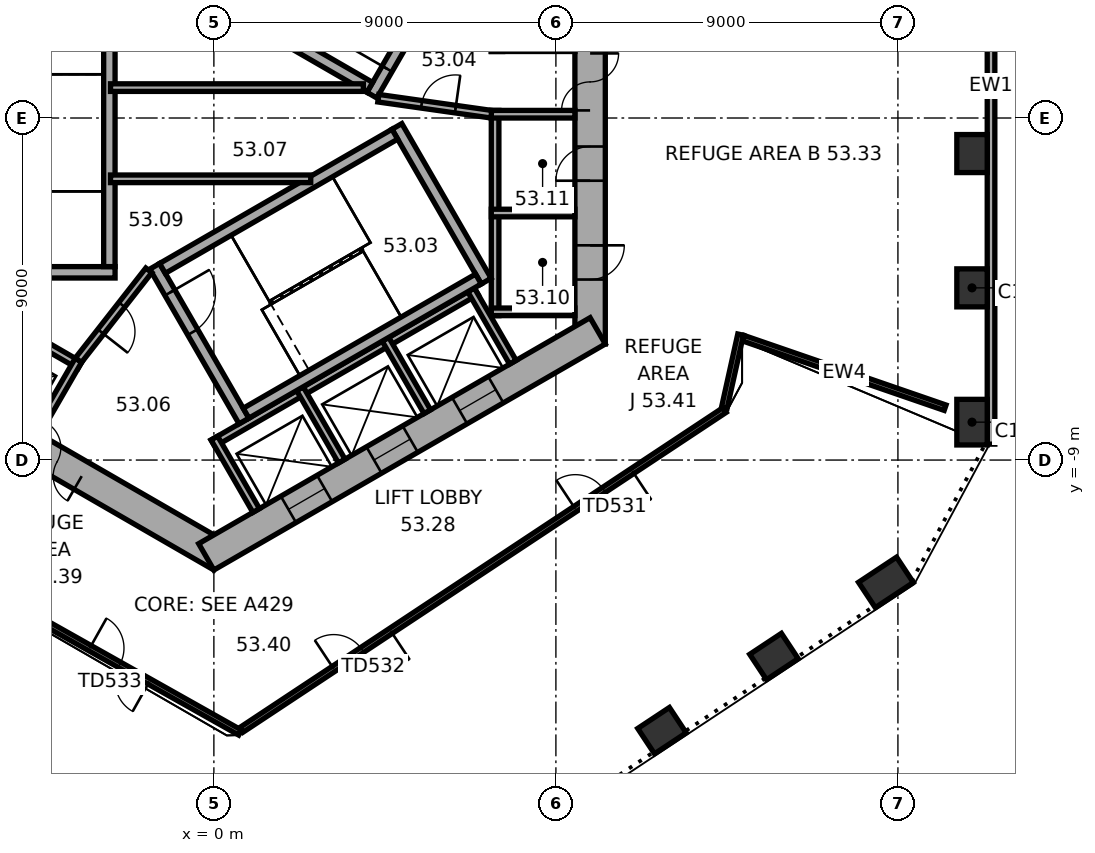
"""IFC4 building model, lengths in metres.
Left out: names, types, materials, properties, quantities, classifications, styles, units other than length and angle.
Written with IfcOpenShell. Run it as: python <this file> out.ifc"""

import sys

from ifc_helpers import new_model, si_unit, direction, frame, frame_2d, origin, origin_2d, place, context, subcontext, project, spatial, rectangle, extrude, element, fill, save


model = new_model("IFC4")
c1 = context("Model", 3, precision=1e-05, world=origin(), true_north=direction((0.0, 1.0)))
c2 = subcontext(c1, "Body", "Model", "MODEL_VIEW")
j1 = project(units=[si_unit("LENGTHUNIT", "METRE"), si_unit("PLANEANGLEUNIT", "RADIAN")], contexts=[c1])
p1 = place(None, origin())
s1 = spatial("IfcSite", under=j1, at=p1, CompositionType="ELEMENT")
p2 = place(p1, origin())
s2 = spatial("IfcBuilding", under=s1, at=p2, CompositionType="ELEMENT")
p3 = place(p2, frame((0.0, 0.0, 214.3)))
s3 = spatial("IfcBuildingStorey", under=s2, at=p3, CompositionType="ELEMENT", Elevation=214.3)
p4 = place(p3, frame((19.95, -8.003, 0.0), z_axis=(0.0, 0.0, 1.0), x_axis=(0.0, 1.0, 0.0)))
e1 = element("IfcColumn", 1, at=p4, inside=s3, PredefinedType="COLUMN", context=c2, shape_type="SweptSolid", body=[
    extrude(rectangle(XDim=1.2, YDim=0.8, at=origin_2d()), origin(), (0.0, 0.0, 1.0), 7.4),
])
for number, where, z_axis, x_axis in (
    (2, (19.95, -4.469, 0.0), (0.0, 0.0, 1.0), (0.0, 1.0, 0.0)),
    (3, (19.95, -0.936, 0.0), (0.0, 0.0, 1.0), (0.0, 1.0, 0.0)),
    (4, (11.791, -16.12, 0.0), (0.0, 0.0, 1.0), (0.834, 0.552, 0.0)),
    (5, (14.738, -14.169, 0.0), (0.0, 0.0, 1.0), (0.834, 0.552, 0.0)),
):
    element("IfcColumn", number, at=place(p3, frame(where, z_axis=z_axis, x_axis=x_axis)), inside=s3, PredefinedType="COLUMN", context=c2, shape_type="SweptSolid", body=[
        extrude(rectangle(XDim=1.0, YDim=0.8, at=origin_2d()), origin(), (0.0, 0.0, 1.0), 7.4),
    ])
p5 = place(p3, frame((17.685, -12.219, 0.0), z_axis=(0.0, 0.0, 1.0), x_axis=(0.833885822067, 0.551936985312, 0.0)))
e6 = element("IfcColumn", 6, at=p5, inside=s3, PredefinedType="COLUMN", context=c2, shape_type="SweptSolid", body=[
    extrude(rectangle(XDim=1.2, YDim=0.8, at=origin_2d()), origin(), (0.0, 0.0, 1.0), 7.4),
])
p6 = place(p3, frame((9.9, -5.947, 0.0), z_axis=(0.0, 0.0, 1.0), x_axis=(0.0, 1.0, 0.0)))
e7 = element("IfcWall", 7, at=p6, inside=s3, PredefinedType="SHEAR", context=c2, shape_type="SweptSolid", body=[
    extrude(rectangle(XDim=11.894, YDim=0.8, at=frame_2d((5.947, 0.0))), origin(), (0.0, 0.0, 1.0), 7.4),
])
p7 = place(p6, frame((6.147, 0.0, 0.0)))
e8 = element("IfcOpeningElement", 8, at=p7, cuts=e7, PredefinedType="OPENING", context=c2, shape_type="SweptSolid", body=[
    extrude(rectangle(XDim=1.5, YDim=2.1, at=frame_2d((0.75, 1.05))), frame((0.0, 0.41, 0.0), z_axis=(0.0, -1.0, 0.0), x_axis=(1.0, 0.0, 0.0)), (0.0, 0.0, 1.0), 0.82),
])
p8 = place(p6, frame((1.697, 0.0, 0.0)))
e9 = element("IfcOpeningElement", 9, at=p8, cuts=e7, PredefinedType="OPENING", context=c2, shape_type="SweptSolid", body=[
    extrude(rectangle(XDim=0.9, YDim=2.1, at=frame_2d((0.45, 1.05))), frame((0.0, 0.41, 0.0), z_axis=(0.0, -1.0, 0.0), x_axis=(1.0, 0.0, 0.0)), (0.0, 0.0, 1.0), 0.82),
])
p9 = place(p6, frame((4.297, 0.0, 0.0)))
e10 = element("IfcOpeningElement", 10, at=p9, cuts=e7, PredefinedType="OPENING", context=c2, shape_type="SweptSolid", body=[
    extrude(rectangle(XDim=0.9, YDim=2.1, at=frame_2d((0.45, 1.05))), frame((0.0, 0.41, 0.0), z_axis=(0.0, -1.0, 0.0), x_axis=(1.0, 0.0, 0.0)), (0.0, 0.0, 1.0), 0.82),
])
p10 = place(p3, frame((-10.1, -5.6, 0.0), z_axis=(0.0, 0.0, 1.0), x_axis=(0.866023897231, -0.500002609418, 0.0)))
e11 = element("IfcWall", 11, at=p10, inside=s3, PredefinedType="SHEAR", context=c2, shape_type="SweptSolid", body=[
    extrude(rectangle(XDim=11.894, YDim=0.8, at=frame_2d((5.947, 0.0))), origin(), (0.0, 0.0, 1.0), 7.4),
])
p11 = place(p10, frame((6.147, 0.0, 0.0)))
e12 = element("IfcOpeningElement", 12, at=p11, cuts=e11, PredefinedType="OPENING", context=c2, shape_type="SweptSolid", body=[
    extrude(rectangle(XDim=1.5, YDim=2.1, at=frame_2d((0.75, 1.05))), frame((0.0, 0.41, 0.0), z_axis=(0.0, -1.0, 0.0), x_axis=(1.0, 0.0, 0.0)), (0.0, 0.0, 1.0), 0.82),
])
p12 = place(p10, frame((1.597, 0.0, 0.0)))
e13 = element("IfcOpeningElement", 13, at=p12, cuts=e11, PredefinedType="OPENING", context=c2, shape_type="SweptSolid", body=[
    extrude(rectangle(XDim=1.1, YDim=2.1, at=frame_2d((0.55, 1.05))), frame((0.0, 0.41, 0.0), z_axis=(0.0, -1.0, 0.0), x_axis=(1.0, 0.0, 0.0)), (0.0, 0.0, 1.0), 0.82),
])
p13 = place(p10, frame((4.197, 0.0, 0.0)))
e14 = element("IfcOpeningElement", 14, at=p13, cuts=e11, PredefinedType="OPENING", context=c2, shape_type="SweptSolid", body=[
    extrude(rectangle(XDim=1.1, YDim=2.1, at=frame_2d((0.55, 1.05))), frame((0.0, 0.41, 0.0), z_axis=(0.0, -1.0, 0.0), x_axis=(1.0, 0.0, 0.0)), (0.0, 0.0, 1.0), 0.82),
])
p14 = place(p3, frame((-0.2, -11.547, 0.0), z_axis=(0.0, 0.0, 1.0), x_axis=(0.866023897231, 0.500002609418, 0.0)))
e15 = element("IfcWall", 15, at=p14, inside=s3, PredefinedType="SHEAR", context=c2, shape_type="SweptSolid", body=[
    extrude(rectangle(XDim=11.894, YDim=0.8, at=frame_2d((5.947, 0.0))), origin(), (0.0, 0.0, 1.0), 7.4),
])
p15 = place(p14, frame((2.497, 0.0, 0.0)))
e16 = element("IfcOpeningElement", 16, at=p15, cuts=e15, PredefinedType="OPENING", context=c2, shape_type="SweptSolid", body=[
    extrude(rectangle(XDim=1.1, YDim=2.1, at=frame_2d((0.55, 1.05))), frame((0.0, 0.41, 0.0), z_axis=(0.0, -1.0, 0.0), x_axis=(1.0, 0.0, 0.0)), (0.0, 0.0, 1.0), 0.82),
])
p16 = place(p14, frame((5.097, 0.0, 0.0)))
e17 = element("IfcOpeningElement", 17, at=p16, cuts=e15, PredefinedType="OPENING", context=c2, shape_type="SweptSolid", body=[
    extrude(rectangle(XDim=1.1, YDim=2.1, at=frame_2d((0.55, 1.05))), frame((0.0, 0.41, 0.0), z_axis=(0.0, -1.0, 0.0), x_axis=(1.0, 0.0, 0.0)), (0.0, 0.0, 1.0), 0.82),
])
p17 = place(p14, frame((7.697, 0.0, 0.0)))
e18 = element("IfcOpeningElement", 18, at=p17, cuts=e15, PredefinedType="OPENING", context=c2, shape_type="SweptSolid", body=[
    extrude(rectangle(XDim=1.1, YDim=2.1, at=frame_2d((0.55, 1.05))), frame((0.0, 0.41, 0.0), z_axis=(0.0, -1.0, 0.0), x_axis=(1.0, 0.0, 0.0)), (0.0, 0.0, 1.0), 0.82),
])
p18 = place(p3, frame((20.45, -8.581, 0.0), z_axis=(0.0, 0.0, 1.0), x_axis=(0.0, 1.0, 0.0)))
e19 = element("IfcWall", 19, at=p18, inside=s3, PredefinedType="STANDARD", context=c2, shape_type="SweptSolid", body=[
    extrude(rectangle(XDim=18.832, YDim=0.2, at=frame_2d((9.416, 0.0))), origin(), (0.0, 0.0, 1.0), 7.4),
])
p19 = place(p3, frame((19.242, -7.623, 0.0), z_axis=(0.0, 0.0, 1.0), x_axis=(-0.945463903204, 0.325726891334, 0.0)))
e20 = element("IfcWall", 20, at=p19, inside=s3, PredefinedType="STANDARD", context=c2, shape_type="SweptSolid", body=[
    extrude(rectangle(XDim=5.619, YDim=0.15, at=frame_2d((2.81, 0.0))), origin(), (0.0, 0.0, 1.0), 2.6),
])
p20 = place(p3, frame((13.859, -5.699, 0.0), z_axis=(0.0, 0.0, 1.0), x_axis=(-0.216825744963, -0.976210323814, 0.0)))
e21 = element("IfcWall", 21, at=p20, inside=s3, PredefinedType="STANDARD", context=c2, shape_type="SweptSolid", body=[
    extrude(rectangle(XDim=1.975, YDim=0.15, at=frame_2d((0.987, 0.0))), origin(), (0.0, 0.0, 1.0), 2.6),
])
p21 = place(p3, frame((13.44, -7.683, 0.0), z_axis=(0.0, 0.0, 1.0), x_axis=(-0.833878347594, -0.551948277844, 0.0)))
e22 = element("IfcWall", 22, at=p21, inside=s3, PredefinedType="STANDARD", context=c2, shape_type="SweptSolid", body=[
    extrude(rectangle(XDim=15.249, YDim=0.15, at=frame_2d((7.625, 0.0))), origin(), (0.0, 0.0, 1.0), 2.6),
])
p22 = place(p21, frame((2.912, 0.0, 0.0)))
e23 = element("IfcOpeningElement", 23, at=p22, cuts=e22, PredefinedType="OPENING", context=c2, shape_type="SweptSolid", body=[
    extrude(rectangle(XDim=1.8, YDim=2.4, at=frame_2d((0.9, 1.2))), frame((0.0, 0.085, 0.0), z_axis=(0.0, -1.0, 0.0), x_axis=(1.0, 0.0, 0.0)), (0.0, 0.0, 1.0), 0.17),
])
p23 = place(p21, frame((10.537, 0.0, 0.0)))
e24 = element("IfcOpeningElement", 24, at=p23, cuts=e22, PredefinedType="OPENING", context=c2, shape_type="SweptSolid", body=[
    extrude(rectangle(XDim=1.8, YDim=2.4, at=frame_2d((0.9, 1.2))), frame((0.0, 0.085, 0.0), z_axis=(0.0, -1.0, 0.0), x_axis=(1.0, 0.0, 0.0)), (0.0, 0.0, 1.0), 0.17),
])
p24 = place(p3, frame((0.69, -16.171, 0.0), z_axis=(0.0, 0.0, 1.0), x_axis=(-0.871655280677, 0.490119446326, 0.0)))
e25 = element("IfcWall", 25, at=p24, inside=s3, PredefinedType="STANDARD", context=c2, shape_type="SweptSolid", body=[
    extrude(rectangle(XDim=14.552, YDim=0.15, at=frame_2d((7.276, 0.0))), origin(), (0.0, 0.0, 1.0), 2.6),
])
p25 = place(p24, frame((2.738, 0.0, 0.0)))
e26 = element("IfcOpeningElement", 26, at=p25, cuts=e25, PredefinedType="OPENING", context=c2, shape_type="SweptSolid", body=[
    extrude(rectangle(XDim=1.8, YDim=2.4, at=frame_2d((0.9, 1.2))), frame((0.0, 0.085, 0.0), z_axis=(0.0, -1.0, 0.0), x_axis=(1.0, 0.0, 0.0)), (0.0, 0.0, 1.0), 0.17),
])
p26 = place(p24, frame((10.014, 0.0, 0.0)))
e27 = element("IfcOpeningElement", 27, at=p26, cuts=e25, PredefinedType="OPENING", context=c2, shape_type="SweptSolid", body=[
    extrude(rectangle(XDim=1.8, YDim=2.4, at=frame_2d((0.9, 1.2))), frame((0.0, 0.085, 0.0), z_axis=(0.0, -1.0, 0.0), x_axis=(1.0, 0.0, 0.0)), (0.0, 0.0, 1.0), 0.17),
])
p27 = place(p3, frame((7.4, -5.2, 0.0), z_axis=(0.0, 0.0, 1.0), x_axis=(0.0, 1.0, 0.0)))
e28 = element("IfcWall", 28, at=p27, inside=s3, PredefinedType="PARTITIONING", context=c2, shape_type="SweptSolid", body=[
    extrude(rectangle(XDim=5.4, YDim=0.2, at=frame_2d((2.7, 0.0))), origin(), (0.0, 0.0, 1.0), 7.12),
])
for number, where, z_axis, x_axis in (
    (29, (7.3, -5.1, 0.0), (0.0, 0.0, 1.0), (1.0, 0.0, 0.0)),
    (30, (7.3, -2.5, 0.0), (0.0, 0.0, 1.0), (1.0, 0.0, 0.0)),
    (31, (7.3, 0.1, 0.0), (0.0, 0.0, 1.0), (1.0, 0.0, 0.0)),
):
    element("IfcWall", number, at=place(p3, frame(where, z_axis=z_axis, x_axis=x_axis)), inside=s3, PredefinedType="PARTITIONING", context=c2, shape_type="SweptSolid", body=[
        extrude(rectangle(XDim=2.2, YDim=0.2, at=frame_2d((1.1, 0.0))), origin(), (0.0, 0.0, 1.0), 7.12),
    ])
p28 = place(p3, frame((-8.203, -3.809, 0.0), z_axis=(0.0, 0.0, 1.0), x_axis=(0.866028230842, -0.499995103361, 0.0)))
e32 = element("IfcWall", 32, at=p28, inside=s3, PredefinedType="PARTITIONING", context=c2, shape_type="SweptSolid", body=[
    extrude(rectangle(XDim=5.4, YDim=0.2, at=frame_2d((2.7, 0.0))), origin(), (0.0, 0.0, 1.0), 7.12),
])
p29 = place(p3, frame((-3.563, -6.372, 0.0), z_axis=(0.0, 0.0, 1.0), x_axis=(-0.499994660107, -0.866028486751, 0.0)))
e33 = element("IfcWall", 33, at=p29, inside=s3, PredefinedType="PARTITIONING", context=c2, shape_type="SweptSolid", body=[
    extrude(rectangle(XDim=2.2, YDim=0.2, at=frame_2d((1.1, 0.0))), origin(), (0.0, 0.0, 1.0), 7.12),
])
p30 = place(p3, frame((-0.024, -8.559, 0.0), z_axis=(0.0, 0.0, 1.0), x_axis=(0.866026010844, 0.49999894854, 0.0)))
e34 = element("IfcWall", 34, at=p30, inside=s3, PredefinedType="PARTITIONING", context=c2, shape_type="SweptSolid", body=[
    extrude(rectangle(XDim=8.0, YDim=0.2, at=frame_2d((4.0, 0.0))), origin(), (0.0, 0.0, 1.0), 7.12),
])
for number, where, z_axis, x_axis in (
    (35, (0.013, -8.422, 0.0), (0.0, 0.0, 1.0), (0.5, -0.866, 0.0)),
    (36, (2.264, -7.122, 0.0), (0.0, 0.0, 1.0), (0.5, -0.866, 0.0)),
    (37, (4.516, -5.822, 0.0), (0.0, 0.0, 1.0), (0.5, -0.866, 0.0)),
    (38, (6.768, -4.522, 0.0), (0.0, 0.0, 1.0), (0.5, -0.866, 0.0)),
):
    element("IfcWall", number, at=place(p3, frame(where, z_axis=z_axis, x_axis=x_axis)), inside=s3, PredefinedType="PARTITIONING", context=c2, shape_type="SweptSolid", body=[
        extrude(rectangle(XDim=2.2, YDim=0.2, at=frame_2d((1.1, 0.0))), origin(), (0.0, 0.0, 1.0), 7.12),
    ])
p31 = place(p3, frame((4.158, 0.602, 0.0), z_axis=(0.0, 0.0, 1.0), x_axis=(0.499977259774, 0.866038532462, 0.0)))
e39 = element("IfcWall", 39, at=p31, inside=s3, PredefinedType="SHEAR", context=c2, shape_type="SweptSolid", body=[
    extrude(rectangle(XDim=4.7, YDim=0.3, at=frame_2d((2.35, 0.0))), origin(), (0.0, 0.0, 1.0), 7.12),
])
p32 = place(p31, frame((0.8, 0.0, 0.0)))
e40 = element("IfcOpeningElement", 40, at=p32, cuts=e39, PredefinedType="OPENING", context=c2, shape_type="SweptSolid", body=[
    extrude(rectangle(XDim=1.2, YDim=2.1, at=frame_2d((0.6, 1.05))), frame((0.0, 0.16, 0.0), z_axis=(0.0, -1.0, 0.0), x_axis=(1.0, 0.0, 0.0)), (0.0, 0.0, 1.0), 0.32),
])
p33 = place(p3, frame((4.103, 0.807, 0.0), z_axis=(0.0, 0.0, 1.0), x_axis=(-0.866027801685, 0.499995846692, 0.0)))
e41 = element("IfcWall", 41, at=p33, inside=s3, PredefinedType="SHEAR", context=c2, shape_type="SweptSolid", body=[
    extrude(rectangle(XDim=7.06, YDim=0.3, at=frame_2d((3.53, 0.0))), origin(), (0.0, 0.0, 1.0), 7.12),
])
p34 = place(p3, frame((-2.6, -4.06, 0.0), z_axis=(0.0, 0.0, 1.0), x_axis=(-1.0, 0.0, 0.0)))
e42 = element("IfcWall", 42, at=p34, inside=s3, PredefinedType="SHEAR", context=c2, shape_type="SweptSolid", body=[
    extrude(rectangle(XDim=4.7, YDim=0.3, at=frame_2d((2.35, 0.0))), origin(), (0.0, 0.0, 1.0), 7.12),
])
p35 = place(p3, frame((-2.75, 3.15, 0.0), z_axis=(0.0, 0.0, 1.0), x_axis=(0.0, -1.0, 0.0)))
e43 = element("IfcWall", 43, at=p35, inside=s3, PredefinedType="SHEAR", context=c2, shape_type="SweptSolid", body=[
    extrude(rectangle(XDim=7.06, YDim=0.3, at=frame_2d((3.53, 0.0))), origin(), (0.0, 0.0, 1.0), 7.12),
])
p36 = place(p3, frame((-1.558, -3.902, 0.0), z_axis=(0.0, 0.0, 1.0), x_axis=(0.499977259774, -0.866038532462, 0.0)))
e44 = element("IfcWall", 44, at=p36, inside=s3, PredefinedType="SHEAR", context=c2, shape_type="SweptSolid", body=[
    extrude(rectangle(XDim=4.7, YDim=0.3, at=frame_2d((2.35, 0.0))), origin(), (0.0, 0.0, 1.0), 7.12),
])
p37 = place(p36, frame((0.8, 0.0, 0.0)))
e45 = element("IfcOpeningElement", 45, at=p37, cuts=e44, PredefinedType="OPENING", context=c2, shape_type="SweptSolid", body=[
    extrude(rectangle(XDim=1.2, YDim=2.1, at=frame_2d((0.6, 1.05))), frame((0.0, 0.16, 0.0), z_axis=(0.0, -1.0, 0.0), x_axis=(1.0, 0.0, 0.0)), (0.0, 0.0, 1.0), 0.32),
])
p38 = place(p3, frame((4.816, -0.222, 0.0), z_axis=(0.0, 0.0, 1.0), x_axis=(0.499977259774, -0.866038532462, 0.0)))
e46 = element("IfcWall", 46, at=p38, inside=s3, PredefinedType="SHEAR", context=c2, shape_type="SweptSolid", body=[
    extrude(rectangle(XDim=4.7, YDim=0.3, at=frame_2d((2.35, 0.0))), origin(), (0.0, 0.0, 1.0), 7.12),
])
for number, where, z_axis, x_axis in (
    (47, (-1.353, -3.957, 0.0), (0.0, 0.0, 1.0), (0.866, 0.5, 0.0)),
    (48, (0.847, -7.767, 0.0), (0.0, 0.0, 1.0), (0.866, 0.5, 0.0)),
):
    element("IfcWall", number, at=place(p3, frame(where, z_axis=z_axis, x_axis=x_axis)), inside=s3, PredefinedType="SHEAR", context=c2, shape_type="SweptSolid", body=[
        extrude(rectangle(XDim=7.06, YDim=0.3, at=frame_2d((3.53, 0.0))), origin(), (0.0, 0.0, 1.0), 7.12),
    ])
p39 = place(p3, frame((4.327, 0.521, 0.0), z_axis=(0.0, 0.0, 1.0), x_axis=(0.990124376366, -0.14019172346, 0.0)))
e49 = element("IfcWall", 49, at=p39, inside=s3, PredefinedType="PARTITIONING", context=c2, shape_type="SweptSolid", body=[
    extrude(rectangle(XDim=3.002, YDim=0.2, at=frame_2d((1.501, 0.0))), origin(), (0.0, 0.0, 1.0), 7.12),
])
p40 = place(p39, frame((1.15, 0.0, 0.0)))
e50 = element("IfcOpeningElement", 50, at=p40, cuts=e49, PredefinedType="OPENING", context=c2, shape_type="SweptSolid", body=[
    extrude(rectangle(XDim=0.9, YDim=2.1, at=frame_2d((0.45, 1.05))), frame((0.0, 0.11, 0.0), z_axis=(0.0, -1.0, 0.0), x_axis=(1.0, 0.0, 0.0)), (0.0, 0.0, 1.0), 0.22),
])
p41 = place(p3, frame((-1.712, -4.008, 0.0), z_axis=(0.0, 0.0, 1.0), x_axis=(-0.616549420702, -0.787316208287, 0.0)))
e51 = element("IfcWall", 51, at=p41, inside=s3, PredefinedType="PARTITIONING", context=c2, shape_type="SweptSolid", body=[
    extrude(rectangle(XDim=3.002, YDim=0.2, at=frame_2d((1.501, 0.0))), origin(), (0.0, 0.0, 1.0), 7.12),
])
p42 = place(p41, frame((1.15, 0.0, 0.0)))
e52 = element("IfcOpeningElement", 52, at=p42, cuts=e51, PredefinedType="OPENING", context=c2, shape_type="SweptSolid", body=[
    extrude(rectangle(XDim=0.9, YDim=2.1, at=frame_2d((0.45, 1.05))), frame((0.0, 0.11, 0.0), z_axis=(0.0, -1.0, 0.0), x_axis=(1.0, 0.0, 0.0)), (0.0, 0.0, 1.0), 0.22),
])
p43 = place(p3, frame((-2.72, -1.6, 0.0), z_axis=(0.0, 0.0, 1.0), x_axis=(1.0, 0.0, 0.0)))
e53 = element("IfcWall", 53, at=p43, inside=s3, PredefinedType="PARTITIONING", context=c2, shape_type="SweptSolid", body=[
    extrude(rectangle(XDim=5.269, YDim=0.2, at=frame_2d((2.634, 0.0))), origin(), (0.0, 0.0, 1.0), 7.12),
])
p44 = place(p3, frame((-2.72, 0.8, 0.0), z_axis=(0.0, 0.0, 1.0), x_axis=(1.0, 0.0, 0.0)))
e54 = element("IfcWall", 54, at=p44, inside=s3, PredefinedType="PARTITIONING", context=c2, shape_type="SweptSolid", body=[
    extrude(rectangle(XDim=6.654, YDim=0.2, at=frame_2d((3.327, 0.0))), origin(), (0.0, 0.0, 1.0), 7.12),
])
p45 = place(p22, origin())
e55 = element("IfcDoor", 55, at=p45, inside=s3, OperationType="DOUBLE_DOOR_DOUBLE_SWING", PredefinedType="DOOR", context=c2, shape_type="SweptSolid", body=[
    extrude(rectangle(XDim=1.8, YDim=2.4, at=frame_2d((0.9, 1.2))), frame((0.0, 0.025, 0.0), z_axis=(0.0, -1.0, 0.0), x_axis=(1.0, 0.0, 0.0)), (0.0, 0.0, 1.0), 0.05),
])
fill(e23, e55)
p46 = place(p23, origin())
e56 = element("IfcDoor", 56, at=p46, inside=s3, OperationType="DOUBLE_DOOR_DOUBLE_SWING", PredefinedType="DOOR", context=c2, shape_type="SweptSolid", body=[
    extrude(rectangle(XDim=1.8, YDim=2.4, at=frame_2d((0.9, 1.2))), frame((0.0, 0.025, 0.0), z_axis=(0.0, -1.0, 0.0), x_axis=(1.0, 0.0, 0.0)), (0.0, 0.0, 1.0), 0.05),
])
fill(e24, e56)
p47 = place(p25, origin())
e57 = element("IfcDoor", 57, at=p47, inside=s3, OperationType="DOUBLE_DOOR_DOUBLE_SWING", PredefinedType="DOOR", context=c2, shape_type="SweptSolid", body=[
    extrude(rectangle(XDim=1.8, YDim=2.4, at=frame_2d((0.9, 1.2))), frame((0.0, 0.025, 0.0), z_axis=(0.0, -1.0, 0.0), x_axis=(1.0, 0.0, 0.0)), (0.0, 0.0, 1.0), 0.05),
])
fill(e26, e57)
p48 = place(p7, origin())
e58 = element("IfcDoor", 58, at=p48, inside=s3, OperationType="DOUBLE_DOOR_SINGLE_SWING", PredefinedType="DOOR", context=c2, shape_type="SweptSolid", body=[
    extrude(rectangle(XDim=1.5, YDim=2.1, at=frame_2d((0.75, 1.05))), frame((0.0, 0.025, 0.0), z_axis=(0.0, -1.0, 0.0), x_axis=(1.0, 0.0, 0.0)), (0.0, 0.0, 1.0), 0.05),
])
fill(e8, e58)
p49 = place(p11, origin())
e59 = element("IfcDoor", 59, at=p49, inside=s3, OperationType="DOUBLE_DOOR_SINGLE_SWING", PredefinedType="DOOR", context=c2, shape_type="SweptSolid", body=[
    extrude(rectangle(XDim=1.5, YDim=2.1, at=frame_2d((0.75, 1.05))), frame((0.0, 0.025, 0.0), z_axis=(0.0, -1.0, 0.0), x_axis=(1.0, 0.0, 0.0)), (0.0, 0.0, 1.0), 0.05),
])
fill(e12, e59)
p50 = place(p32, origin())
e60 = element("IfcDoor", 60, at=p50, inside=s3, OperationType="SINGLE_SWING_RIGHT", PredefinedType="DOOR", context=c2, shape_type="SweptSolid", body=[
    extrude(rectangle(XDim=1.2, YDim=2.1, at=frame_2d((0.6, 1.05))), frame((0.0, 0.025, 0.0), z_axis=(0.0, -1.0, 0.0), x_axis=(1.0, 0.0, 0.0)), (0.0, 0.0, 1.0), 0.05),
])
fill(e40, e60)
p51 = place(p37, origin())
e61 = element("IfcDoor", 61, at=p51, inside=s3, OperationType="SINGLE_SWING_RIGHT", PredefinedType="DOOR", context=c2, shape_type="SweptSolid", body=[
    extrude(rectangle(XDim=1.2, YDim=2.1, at=frame_2d((0.6, 1.05))), frame((0.0, 0.025, 0.0), z_axis=(0.0, -1.0, 0.0), x_axis=(1.0, 0.0, 0.0)), (0.0, 0.0, 1.0), 0.05),
])
fill(e45, e61)
p52 = place(p40, origin())
e62 = element("IfcDoor", 62, at=p52, inside=s3, OperationType="SINGLE_SWING_LEFT", PredefinedType="DOOR", context=c2, shape_type="SweptSolid", body=[
    extrude(rectangle(XDim=0.9, YDim=2.1, at=frame_2d((0.45, 1.05))), frame((0.0, 0.025, 0.0), z_axis=(0.0, -1.0, 0.0), x_axis=(1.0, 0.0, 0.0)), (0.0, 0.0, 1.0), 0.05),
])
fill(e50, e62)
p53 = place(p42, origin())
e63 = element("IfcDoor", 63, at=p53, inside=s3, OperationType="SINGLE_SWING_LEFT", PredefinedType="DOOR", context=c2, shape_type="SweptSolid", body=[
    extrude(rectangle(XDim=0.9, YDim=2.1, at=frame_2d((0.45, 1.05))), frame((0.0, 0.025, 0.0), z_axis=(0.0, -1.0, 0.0), x_axis=(1.0, 0.0, 0.0)), (0.0, 0.0, 1.0), 0.05),
])
fill(e52, e63)
p54 = place(p8, origin())
e64 = element("IfcDoor", 64, at=p54, inside=s3, OperationType="SINGLE_SWING_LEFT", PredefinedType="DOOR", context=c2, shape_type="SweptSolid", body=[
    extrude(rectangle(XDim=0.9, YDim=2.1, at=frame_2d((0.45, 1.05))), frame((0.0, 0.025, 0.0), z_axis=(0.0, -1.0, 0.0), x_axis=(1.0, 0.0, 0.0)), (0.0, 0.0, 1.0), 0.05),
])
fill(e9, e64)
p55 = place(p9, origin())
e65 = element("IfcDoor", 65, at=p55, inside=s3, OperationType="SINGLE_SWING_LEFT", PredefinedType="DOOR", context=c2, shape_type="SweptSolid", body=[
    extrude(rectangle(XDim=0.9, YDim=2.1, at=frame_2d((0.45, 1.05))), frame((0.0, 0.025, 0.0), z_axis=(0.0, -1.0, 0.0), x_axis=(1.0, 0.0, 0.0)), (0.0, 0.0, 1.0), 0.05),
])
fill(e10, e65)
p56 = place(p15, origin())
e66 = element("IfcDoor", 66, at=p56, inside=s3, OperationType="DOUBLE_DOOR_SLIDING", PredefinedType="DOOR", context=c2, shape_type="SweptSolid", body=[
    extrude(rectangle(XDim=1.1, YDim=2.1, at=frame_2d((0.55, 1.05))), frame((0.0, 0.025, 0.0), z_axis=(0.0, -1.0, 0.0), x_axis=(1.0, 0.0, 0.0)), (0.0, 0.0, 1.0), 0.05),
])
fill(e16, e66)
p57 = place(p16, origin())
e67 = element("IfcDoor", 67, at=p57, inside=s3, OperationType="DOUBLE_DOOR_SLIDING", PredefinedType="DOOR", context=c2, shape_type="SweptSolid", body=[
    extrude(rectangle(XDim=1.1, YDim=2.1, at=frame_2d((0.55, 1.05))), frame((0.0, 0.025, 0.0), z_axis=(0.0, -1.0, 0.0), x_axis=(1.0, 0.0, 0.0)), (0.0, 0.0, 1.0), 0.05),
])
fill(e17, e67)
p58 = place(p17, origin())
e68 = element("IfcDoor", 68, at=p58, inside=s3, OperationType="DOUBLE_DOOR_SLIDING", PredefinedType="DOOR", context=c2, shape_type="SweptSolid", body=[
    extrude(rectangle(XDim=1.1, YDim=2.1, at=frame_2d((0.55, 1.05))), frame((0.0, 0.025, 0.0), z_axis=(0.0, -1.0, 0.0), x_axis=(1.0, 0.0, 0.0)), (0.0, 0.0, 1.0), 0.05),
])
fill(e18, e68)
save(model, sys.argv[1])
